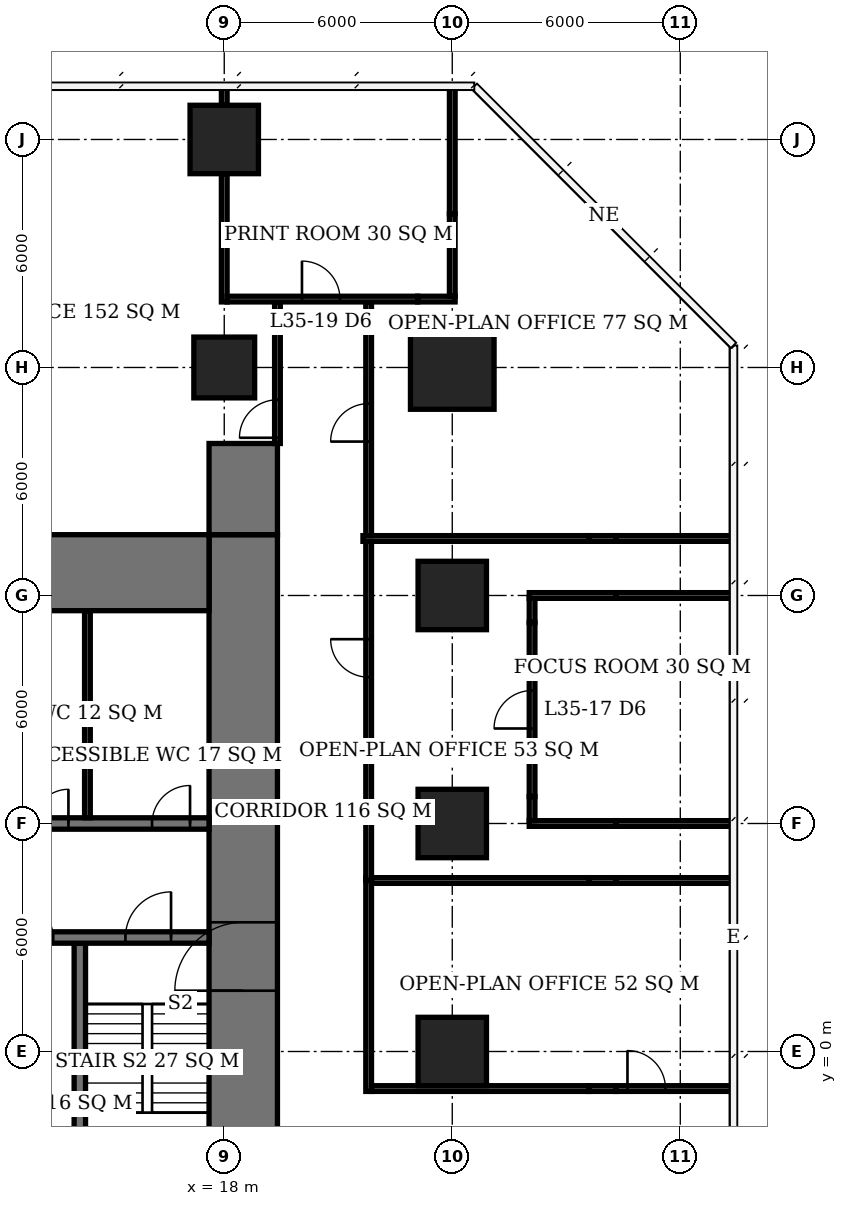
"""IFC4 building model, lengths in metres.
Left out: names, types, materials, properties, quantities, classifications, styles, units other than length and angle.
Written with IfcOpenShell. Run it as: python <this file> out.ifc"""

import sys

from ifc_helpers import new_model, si_unit, direction, frame, frame_2d, origin, origin_2d, place, context, subcontext, project, spatial, rectangle, extrude, element, fill, save


model = new_model("IFC4")
c1 = context("Model", 3, precision=1e-05, world=origin(), true_north=direction((0.0, 1.0)))
c2 = subcontext(c1, "Body", "Model", "MODEL_VIEW")
j1 = project(units=[si_unit("LENGTHUNIT", "METRE"), si_unit("PLANEANGLEUNIT", "RADIAN")], contexts=[c1])
p1 = place(None, origin())
s1 = spatial("IfcSite", under=j1, at=p1, CompositionType="ELEMENT")
p2 = place(p1, origin())
s2 = spatial("IfcBuilding", under=s1, at=p2, CompositionType="ELEMENT")
p3 = place(p2, frame((0.0, 0.0, 144.5)))
s3 = spatial("IfcBuildingStorey", under=s2, at=p3, CompositionType="ELEMENT", Elevation=144.5)
p4 = place(p3, frame((18.0, 18.0, 0.0), z_axis=(0.0, 0.0, 1.0), x_axis=(1.0, 0.0, 0.0)))
e1 = element("IfcColumn", 1, at=p4, inside=s3, PredefinedType="COLUMN", context=c2, shape_type="SweptSolid", body=[
    extrude(rectangle(XDim=1.6, YDim=1.6, at=origin_2d()), origin(), (0.0, 0.0, 1.0), 3.9),
])
for number, where, z_axis, x_axis in (
    (2, (18.0, 24.0, 0.0), (0.0, 0.0, 1.0), (1.0, 0.0, 0.0)),
    (3, (24.0, 0.0, 0.0), (0.0, 0.0, 1.0), (1.0, 0.0, 0.0)),
    (4, (24.0, 6.0, 0.0), (0.0, 0.0, 1.0), (1.0, 0.0, 0.0)),
    (5, (24.0, 12.0, 0.0), (0.0, 0.0, 1.0), (1.0, 0.0, 0.0)),
):
    element("IfcColumn", number, at=place(p3, frame(where, z_axis=z_axis, x_axis=x_axis)), inside=s3, PredefinedType="COLUMN", context=c2, shape_type="SweptSolid", body=[
        extrude(rectangle(XDim=1.8, YDim=1.8, at=origin_2d()), origin(), (0.0, 0.0, 1.0), 3.9),
    ])
p5 = place(p3, frame((24.0, 18.0, 0.0), z_axis=(0.0, 0.0, 1.0), x_axis=(1.0, 0.0, 0.0)))
e6 = element("IfcColumn", 6, at=p5, inside=s3, PredefinedType="COLUMN", context=c2, shape_type="SweptSolid", body=[
    extrude(rectangle(XDim=2.2, YDim=2.2, at=origin_2d()), origin(), (0.0, 0.0, 1.0), 3.9),
])
p6 = place(p3, frame((-5.6, 12.6, 0.0), z_axis=(0.0, 0.0, 1.0), x_axis=(1.0, 0.0, 0.0)))
e7 = element("IfcWall", 7, at=p6, inside=s3, PredefinedType="SHEAR", context=c2, shape_type="SweptSolid", body=[
    extrude(rectangle(XDim=23.2, YDim=2.0, at=frame_2d((11.6, 0.0))), origin(), (0.0, 0.0, 1.0), 3.9),
])
p7 = place(p3, frame((18.5, -7.6, 0.0), z_axis=(0.0, 0.0, 1.0), x_axis=(0.0, 1.0, 0.0)))
e8 = element("IfcWall", 8, at=p7, inside=s3, PredefinedType="SHEAR", context=c2, shape_type="SweptSolid", body=[
    extrude(rectangle(XDim=21.2, YDim=1.8, at=frame_2d((10.6, 0.0))), origin(), (0.0, 0.0, 1.0), 3.9),
])
p8 = place(p7, frame((9.2, 0.0, 0.0)))
e9 = element("IfcOpeningElement", 9, at=p8, cuts=e8, PredefinedType="OPENING", context=c2, shape_type="SweptSolid", body=[
    extrude(rectangle(XDim=1.8, YDim=2.4, at=frame_2d((0.9, 1.2))), frame((0.0, 0.91, 0.0), z_axis=(0.0, -1.0, 0.0), x_axis=(1.0, 0.0, 0.0)), (0.0, 0.0, 1.0), 1.82),
])
p9 = place(p3, frame((18.5, 13.6, 0.0), z_axis=(0.0, 0.0, 1.0), x_axis=(0.0, 1.0, 0.0)))
e10 = element("IfcWall", 10, at=p9, inside=s3, PredefinedType="SHEAR", context=c2, shape_type="SweptSolid", body=[
    extrude(rectangle(XDim=2.4, YDim=1.8, at=frame_2d((1.2, 0.0))), origin(), (0.0, 0.0, 1.0), 3.9),
])
p10 = place(p3, frame((12.15, 3.0, 0.0), z_axis=(0.0, 0.0, 1.0), x_axis=(1.0, 0.0, 0.0)))
e11 = element("IfcWall", 11, at=p10, inside=s3, PredefinedType="SHEAR", context=c2, shape_type="SweptSolid", body=[
    extrude(rectangle(XDim=5.45, YDim=0.3, at=frame_2d((2.725, 0.0))), origin(), (0.0, 0.0, 1.0), 3.9),
])
p11 = place(p10, frame((3.25, 0.0, 0.0)))
e12 = element("IfcOpeningElement", 12, at=p11, cuts=e11, PredefinedType="OPENING", context=c2, shape_type="SweptSolid", body=[
    extrude(rectangle(XDim=1.2, YDim=2.1, at=frame_2d((0.6, 1.05))), frame((0.0, 0.16, 0.0), z_axis=(0.0, -1.0, 0.0), x_axis=(1.0, 0.0, 0.0)), (0.0, 0.0, 1.0), 0.32),
])
p12 = place(p10, frame((0.45, 0.0, 0.0)))
e13 = element("IfcOpeningElement", 13, at=p12, cuts=e11, PredefinedType="OPENING", context=c2, shape_type="SweptSolid", body=[
    extrude(rectangle(XDim=0.9, YDim=2.1, at=frame_2d((0.45, 1.05))), frame((0.0, 0.16, 0.0), z_axis=(0.0, -1.0, 0.0), x_axis=(1.0, 0.0, 0.0)), (0.0, 0.0, 1.0), 0.32),
])
p13 = place(p3, frame((-0.15, 6.0, 0.0), z_axis=(0.0, 0.0, 1.0), x_axis=(1.0, 0.0, 0.0)))
e14 = element("IfcWall", 14, at=p13, inside=s3, PredefinedType="SHEAR", context=c2, shape_type="SweptSolid", body=[
    extrude(rectangle(XDim=17.75, YDim=0.3, at=frame_2d((8.875, 0.0))), origin(), (0.0, 0.0, 1.0), 3.9),
])
p14 = place(p13, frame((13.15, 0.0, 0.0)))
e15 = element("IfcOpeningElement", 15, at=p14, cuts=e14, PredefinedType="OPENING", context=c2, shape_type="SweptSolid", body=[
    extrude(rectangle(XDim=0.9, YDim=2.1, at=frame_2d((0.45, 1.05))), frame((0.0, 0.16, 0.0), z_axis=(0.0, -1.0, 0.0), x_axis=(1.0, 0.0, 0.0)), (0.0, 0.0, 1.0), 0.32),
])
p15 = place(p13, frame((16.25, 0.0, 0.0)))
e16 = element("IfcOpeningElement", 16, at=p15, cuts=e14, PredefinedType="OPENING", context=c2, shape_type="SweptSolid", body=[
    extrude(rectangle(XDim=1.0, YDim=2.1, at=frame_2d((0.5, 1.05))), frame((0.0, 0.16, 0.0), z_axis=(0.0, -1.0, 0.0), x_axis=(1.0, 0.0, 0.0)), (0.0, 0.0, 1.0), 0.32),
])
p16 = place(p13, frame((7.25, 0.0, 0.0)))
e17 = element("IfcOpeningElement", 17, at=p16, cuts=e14, PredefinedType="OPENING", context=c2, shape_type="SweptSolid", body=[
    extrude(rectangle(XDim=1.0, YDim=2.1, at=frame_2d((0.5, 1.05))), frame((0.0, 0.16, 0.0), z_axis=(0.0, -1.0, 0.0), x_axis=(1.0, 0.0, 0.0)), (0.0, 0.0, 1.0), 0.32),
])
p17 = place(p13, frame((1.1, 0.0, 0.0)))
e18 = element("IfcOpeningElement", 18, at=p17, cuts=e14, PredefinedType="OPENING", context=c2, shape_type="SweptSolid", body=[
    extrude(rectangle(XDim=1.1, YDim=2.1, at=frame_2d((0.55, 1.05))), frame((0.0, 0.16, 0.0), z_axis=(0.0, -1.0, 0.0), x_axis=(1.0, 0.0, 0.0)), (0.0, 0.0, 1.0), 0.32),
])
p18 = place(p13, frame((4.1, 0.0, 0.0)))
e19 = element("IfcOpeningElement", 19, at=p18, cuts=e14, PredefinedType="OPENING", context=c2, shape_type="SweptSolid", body=[
    extrude(rectangle(XDim=1.1, YDim=2.1, at=frame_2d((0.55, 1.05))), frame((0.0, 0.16, 0.0), z_axis=(0.0, -1.0, 0.0), x_axis=(1.0, 0.0, 0.0)), (0.0, 0.0, 1.0), 0.32),
])
p19 = place(p3, frame((14.2, -5.6, 0.0), z_axis=(0.0, 0.0, 1.0), x_axis=(0.0, 1.0, 0.0)))
e20 = element("IfcWall", 20, at=p19, inside=s3, PredefinedType="SHEAR", context=c2, shape_type="SweptSolid", body=[
    extrude(rectangle(XDim=8.45, YDim=0.3, at=frame_2d((4.225, 0.0))), origin(), (0.0, 0.0, 1.0), 3.9),
])
p20 = place(p3, frame((14.4, 6.15, 0.0), z_axis=(0.0, 0.0, 1.0), x_axis=(0.0, 1.0, 0.0)))
e21 = element("IfcWall", 21, at=p20, inside=s3, PredefinedType="PLUMBINGWALL", context=c2, shape_type="SweptSolid", body=[
    extrude(rectangle(XDim=5.45, YDim=0.15, at=frame_2d((2.725, 0.0))), origin(), (0.0, 0.0, 1.0), 3.65),
])
p21 = place(p3, frame((26.025, 6.0, 0.0), z_axis=(0.0, 0.0, 1.0), x_axis=(1.0, 0.0, 0.0)))
e22 = element("IfcWall", 22, at=p21, inside=s3, PredefinedType="PARTITIONING", context=c2, shape_type="SweptSolid", body=[
    extrude(rectangle(XDim=2.285, YDim=0.15, at=frame_2d((1.143, 0.0))), origin(), (0.0, 0.0, 1.0), 2.65),
])
p22 = place(p3, frame((28.31, 6.0, 0.0), z_axis=(0.0, 0.0, 1.0), x_axis=(1.0, 0.0, 0.0)))
e23 = element("IfcWall", 23, at=p22, inside=s3, PredefinedType="PARTITIONING", context=c2, shape_type="SweptSolid", body=[
    extrude(rectangle(XDim=3.04, YDim=0.15, at=frame_2d((1.52, 0.0))), origin(), (0.0, 0.0, 1.0), 3.65),
])
p23 = place(p3, frame((26.025, 12.0, 0.0), z_axis=(0.0, 0.0, 1.0), x_axis=(1.0, 0.0, 0.0)))
e24 = element("IfcWall", 24, at=p23, inside=s3, PredefinedType="PARTITIONING", context=c2, shape_type="SweptSolid", body=[
    extrude(rectangle(XDim=2.285, YDim=0.15, at=frame_2d((1.143, 0.0))), origin(), (0.0, 0.0, 1.0), 2.65),
])
p24 = place(p3, frame((28.31, 12.0, 0.0), z_axis=(0.0, 0.0, 1.0), x_axis=(1.0, 0.0, 0.0)))
e25 = element("IfcWall", 25, at=p24, inside=s3, PredefinedType="PARTITIONING", context=c2, shape_type="SweptSolid", body=[
    extrude(rectangle(XDim=3.09, YDim=0.15, at=frame_2d((1.545, 0.0))), origin(), (0.0, 0.0, 1.0), 3.65),
])
p25 = place(p3, frame((18.075, 19.8, 0.0), z_axis=(0.0, 0.0, 1.0), x_axis=(1.0, 0.0, 0.0)))
e26 = element("IfcWall", 26, at=p25, inside=s3, PredefinedType="PARTITIONING", context=c2, shape_type="SweptSolid", body=[
    extrude(rectangle(XDim=5.015, YDim=0.15, at=frame_2d((2.508, 0.0))), origin(), (0.0, 0.0, 1.0), 3.65),
])
p26 = place(p25, frame((1.97, 0.0, 0.0)))
e27 = element("IfcOpeningElement", 27, at=p26, cuts=e26, PredefinedType="OPENING", context=c2, shape_type="SweptSolid", body=[
    extrude(rectangle(XDim=1.0, YDim=2.1, at=frame_2d((0.5, 1.05))), frame((0.0, 0.085, 0.0), z_axis=(0.0, -1.0, 0.0), x_axis=(1.0, 0.0, 0.0)), (0.0, 0.0, 1.0), 0.17),
])
p27 = place(p3, frame((23.09, 19.8, 0.0), z_axis=(0.0, 0.0, 1.0), x_axis=(1.0, 0.0, 0.0)))
e28 = element("IfcWall", 28, at=p27, inside=s3, PredefinedType="PARTITIONING", context=c2, shape_type="SweptSolid", body=[
    extrude(rectangle(XDim=0.985, YDim=0.15, at=frame_2d((0.492, 0.0))), origin(), (0.0, 0.0, 1.0), 2.65),
])
p28 = place(p3, frame((18.0, 19.725, 0.0), z_axis=(0.0, 0.0, 1.0), x_axis=(0.0, 1.0, 0.0)))
e29 = element("IfcWall", 29, at=p28, inside=s3, PredefinedType="PARTITIONING", context=c2, shape_type="SweptSolid", body=[
    extrude(rectangle(XDim=3.375, YDim=0.15, at=frame_2d((1.688, 0.0))), origin(), (0.0, 0.0, 1.0), 3.65),
])
p29 = place(p3, frame((18.0, 24.9, 0.0), z_axis=(0.0, 0.0, 1.0), x_axis=(0.0, 1.0, 0.0)))
e30 = element("IfcWall", 30, at=p29, inside=s3, PredefinedType="PARTITIONING", context=c2, shape_type="SweptSolid", body=[
    extrude(rectangle(XDim=0.5, YDim=0.15, at=frame_2d((0.25, 0.0))), origin(), (0.0, 0.0, 1.0), 3.65),
])
p30 = place(p3, frame((24.0, 19.875, 0.0), z_axis=(0.0, 0.0, 1.0), x_axis=(0.0, 1.0, 0.0)))
e31 = element("IfcWall", 31, at=p30, inside=s3, PredefinedType="PARTITIONING", context=c2, shape_type="SweptSolid", body=[
    extrude(rectangle(XDim=2.17, YDim=0.15, at=frame_2d((1.085, 0.0))), origin(), (0.0, 0.0, 1.0), 2.65),
])
p31 = place(p3, frame((24.0, 22.045, 0.0), z_axis=(0.0, 0.0, 1.0), x_axis=(0.0, 1.0, 0.0)))
e32 = element("IfcWall", 32, at=p31, inside=s3, PredefinedType="PARTITIONING", context=c2, shape_type="SweptSolid", body=[
    extrude(rectangle(XDim=3.355, YDim=0.15, at=frame_2d((1.677, 0.0))), origin(), (0.0, 0.0, 1.0), 3.65),
])
p32 = place(p3, frame((26.1, 6.075, 0.0), z_axis=(0.0, 0.0, 1.0), x_axis=(0.0, 1.0, 0.0)))
e33 = element("IfcWall", 33, at=p32, inside=s3, PredefinedType="PARTITIONING", context=c2, shape_type="SweptSolid", body=[
    extrude(rectangle(XDim=0.635, YDim=0.15, at=frame_2d((0.317, 0.0))), origin(), (0.0, 0.0, 1.0), 2.65),
])
p33 = place(p3, frame((26.1, 6.71, 0.0), z_axis=(0.0, 0.0, 1.0), x_axis=(0.0, 1.0, 0.0)))
e34 = element("IfcWall", 34, at=p33, inside=s3, PredefinedType="PARTITIONING", context=c2, shape_type="SweptSolid", body=[
    extrude(rectangle(XDim=4.58, YDim=0.15, at=frame_2d((2.29, 0.0))), origin(), (0.0, 0.0, 1.0), 3.65),
])
p34 = place(p33, frame((1.79, 0.0, 0.0)))
e35 = element("IfcOpeningElement", 35, at=p34, cuts=e34, PredefinedType="OPENING", context=c2, shape_type="SweptSolid", body=[
    extrude(rectangle(XDim=1.0, YDim=2.1, at=frame_2d((0.5, 1.05))), frame((0.0, 0.085, 0.0), z_axis=(0.0, -1.0, 0.0), x_axis=(1.0, 0.0, 0.0)), (0.0, 0.0, 1.0), 0.17),
])
p35 = place(p3, frame((26.1, 11.29, 0.0), z_axis=(0.0, 0.0, 1.0), x_axis=(0.0, 1.0, 0.0)))
e36 = element("IfcWall", 36, at=p35, inside=s3, PredefinedType="PARTITIONING", context=c2, shape_type="SweptSolid", body=[
    extrude(rectangle(XDim=0.635, YDim=0.15, at=frame_2d((0.317, 0.0))), origin(), (0.0, 0.0, 1.0), 2.65),
])
p36 = place(p3, frame((19.4, 16.0, 0.0), z_axis=(0.0, 0.0, 1.0), x_axis=(0.0, 1.0, 0.0)))
e37 = element("IfcWall", 37, at=p36, inside=s3, PredefinedType="PARTITIONING", context=c2, shape_type="SweptSolid", body=[
    extrude(rectangle(XDim=3.725, YDim=0.15, at=frame_2d((1.863, 0.0))), origin(), (0.0, 0.0, 1.0), 3.65),
])
p37 = place(p36, frame((0.15, 0.0, 0.0)))
e38 = element("IfcOpeningElement", 38, at=p37, cuts=e37, PredefinedType="OPENING", context=c2, shape_type="SweptSolid", body=[
    extrude(rectangle(XDim=1.0, YDim=2.1, at=frame_2d((0.5, 1.05))), frame((0.0, 0.085, 0.0), z_axis=(0.0, -1.0, 0.0), x_axis=(1.0, 0.0, 0.0)), (0.0, 0.0, 1.0), 0.17),
])
p38 = place(p3, frame((21.8, -1.05, 0.0), z_axis=(0.0, 0.0, 1.0), x_axis=(0.0, 1.0, 0.0)))
e39 = element("IfcWall", 39, at=p38, inside=s3, PredefinedType="PARTITIONING", context=c2, shape_type="SweptSolid", body=[
    extrude(rectangle(XDim=5.625, YDim=0.15, at=frame_2d((2.812, 0.0))), origin(), (0.0, 0.0, 1.0), 3.65),
])
p39 = place(p3, frame((21.875, -0.975, 0.0), z_axis=(0.0, 0.0, 1.0), x_axis=(1.0, 0.0, 0.0)))
e40 = element("IfcWall", 40, at=p39, inside=s3, PredefinedType="PARTITIONING", context=c2, shape_type="SweptSolid", body=[
    extrude(rectangle(XDim=5.715, YDim=0.15, at=frame_2d((2.857, 0.0))), origin(), (0.0, 0.0, 1.0), 3.65),
])
p40 = place(p3, frame((27.59, -0.975, 0.0), z_axis=(0.0, 0.0, 1.0), x_axis=(1.0, 0.0, 0.0)))
e41 = element("IfcWall", 41, at=p40, inside=s3, PredefinedType="PARTITIONING", context=c2, shape_type="SweptSolid", body=[
    extrude(rectangle(XDim=0.72, YDim=0.15, at=frame_2d((0.36, 0.0))), origin(), (0.0, 0.0, 1.0), 2.65),
])
p41 = place(p3, frame((28.31, -0.975, 0.0), z_axis=(0.0, 0.0, 1.0), x_axis=(1.0, 0.0, 0.0)))
e42 = element("IfcWall", 42, at=p41, inside=s3, PredefinedType="PARTITIONING", context=c2, shape_type="SweptSolid", body=[
    extrude(rectangle(XDim=3.09, YDim=0.15, at=frame_2d((1.545, 0.0))), origin(), (0.0, 0.0, 1.0), 3.65),
])
p42 = place(p41, frame((0.3, 0.0, 0.0)))
e43 = element("IfcOpeningElement", 43, at=p42, cuts=e42, PredefinedType="OPENING", context=c2, shape_type="SweptSolid", body=[
    extrude(rectangle(XDim=1.0, YDim=2.1, at=frame_2d((0.5, 1.05))), frame((0.0, 0.085, 0.0), z_axis=(0.0, -1.0, 0.0), x_axis=(1.0, 0.0, 0.0)), (0.0, 0.0, 1.0), 0.17),
])
p43 = place(p3, frame((21.8, 4.5, 0.0), z_axis=(0.0, 0.0, 1.0), x_axis=(0.0, 1.0, 0.0)))
e44 = element("IfcWall", 44, at=p43, inside=s3, PredefinedType="PARTITIONING", context=c2, shape_type="SweptSolid", body=[
    extrude(rectangle(XDim=8.925, YDim=0.15, at=frame_2d((4.462, 0.0))), origin(), (0.0, 0.0, 1.0), 3.65),
])
p44 = place(p43, frame((5.35, 0.0, 0.0)))
e45 = element("IfcOpeningElement", 45, at=p44, cuts=e44, PredefinedType="OPENING", context=c2, shape_type="SweptSolid", body=[
    extrude(rectangle(XDim=1.0, YDim=2.1, at=frame_2d((0.5, 1.05))), frame((0.0, 0.085, 0.0), z_axis=(0.0, -1.0, 0.0), x_axis=(1.0, 0.0, 0.0)), (0.0, 0.0, 1.0), 0.17),
])
p45 = place(p3, frame((21.875, 4.5, 0.0), z_axis=(0.0, 0.0, 1.0), x_axis=(1.0, 0.0, 0.0)))
e46 = element("IfcWall", 46, at=p45, inside=s3, PredefinedType="PARTITIONING", context=c2, shape_type="SweptSolid", body=[
    extrude(rectangle(XDim=5.715, YDim=0.15, at=frame_2d((2.857, 0.0))), origin(), (0.0, 0.0, 1.0), 3.65),
])
p46 = place(p3, frame((27.59, 4.5, 0.0), z_axis=(0.0, 0.0, 1.0), x_axis=(1.0, 0.0, 0.0)))
e47 = element("IfcWall", 47, at=p46, inside=s3, PredefinedType="PARTITIONING", context=c2, shape_type="SweptSolid", body=[
    extrude(rectangle(XDim=0.72, YDim=0.15, at=frame_2d((0.36, 0.0))), origin(), (0.0, 0.0, 1.0), 2.65),
])
p47 = place(p3, frame((28.31, 4.5, 0.0), z_axis=(0.0, 0.0, 1.0), x_axis=(1.0, 0.0, 0.0)))
e48 = element("IfcWall", 48, at=p47, inside=s3, PredefinedType="PARTITIONING", context=c2, shape_type="SweptSolid", body=[
    extrude(rectangle(XDim=3.09, YDim=0.15, at=frame_2d((1.545, 0.0))), origin(), (0.0, 0.0, 1.0), 3.65),
])
p48 = place(p3, frame((21.8, 13.575, 0.0), z_axis=(0.0, 0.0, 1.0), x_axis=(0.0, 1.0, 0.0)))
e49 = element("IfcWall", 49, at=p48, inside=s3, PredefinedType="PARTITIONING", context=c2, shape_type="SweptSolid", body=[
    extrude(rectangle(XDim=6.15, YDim=0.15, at=frame_2d((3.075, 0.0))), origin(), (0.0, 0.0, 1.0), 3.65),
])
p49 = place(p48, frame((2.475, 0.0, 0.0)))
e50 = element("IfcOpeningElement", 50, at=p49, cuts=e49, PredefinedType="OPENING", context=c2, shape_type="SweptSolid", body=[
    extrude(rectangle(XDim=1.0, YDim=2.1, at=frame_2d((0.5, 1.05))), frame((0.0, 0.085, 0.0), z_axis=(0.0, -1.0, 0.0), x_axis=(1.0, 0.0, 0.0)), (0.0, 0.0, 1.0), 0.17),
])
p50 = place(p3, frame((21.65, 13.5, 0.0), z_axis=(0.0, 0.0, 1.0), x_axis=(1.0, 0.0, 0.0)))
e51 = element("IfcWall", 51, at=p50, inside=s3, PredefinedType="PARTITIONING", context=c2, shape_type="SweptSolid", body=[
    extrude(rectangle(XDim=5.94, YDim=0.15, at=frame_2d((2.97, 0.0))), origin(), (0.0, 0.0, 1.0), 3.65),
])
p51 = place(p3, frame((27.59, 13.5, 0.0), z_axis=(0.0, 0.0, 1.0), x_axis=(1.0, 0.0, 0.0)))
e52 = element("IfcWall", 52, at=p51, inside=s3, PredefinedType="PARTITIONING", context=c2, shape_type="SweptSolid", body=[
    extrude(rectangle(XDim=0.72, YDim=0.15, at=frame_2d((0.36, 0.0))), origin(), (0.0, 0.0, 1.0), 2.65),
])
p52 = place(p3, frame((28.31, 13.5, 0.0), z_axis=(0.0, 0.0, 1.0), x_axis=(1.0, 0.0, 0.0)))
e53 = element("IfcWall", 53, at=p52, inside=s3, PredefinedType="PARTITIONING", context=c2, shape_type="SweptSolid", body=[
    extrude(rectangle(XDim=3.09, YDim=0.15, at=frame_2d((1.545, 0.0))), origin(), (0.0, 0.0, 1.0), 3.65),
])
p53 = place(p8, origin())
e54 = element("IfcDoor", 54, at=p53, inside=s3, OperationType="DOUBLE_DOOR_SINGLE_SWING", PredefinedType="DOOR", context=c2, shape_type="SweptSolid", body=[
    extrude(rectangle(XDim=1.8, YDim=2.4, at=frame_2d((0.9, 1.2))), frame((0.0, 0.025, 0.0), z_axis=(0.0, -1.0, 0.0), x_axis=(1.0, 0.0, 0.0)), (0.0, 0.0, 1.0), 0.05),
])
fill(e9, e54)
p54 = place(p11, origin())
e55 = element("IfcDoor", 55, at=p54, inside=s3, OperationType="SINGLE_SWING_RIGHT", PredefinedType="DOOR", context=c2, shape_type="SweptSolid", body=[
    extrude(rectangle(XDim=1.2, YDim=2.1, at=frame_2d((0.6, 1.05))), frame((0.0, 0.025, 0.0), z_axis=(0.0, -1.0, 0.0), x_axis=(1.0, 0.0, 0.0)), (0.0, 0.0, 1.0), 0.05),
])
fill(e12, e55)
p55 = place(p12, origin())
e56 = element("IfcDoor", 56, at=p55, inside=s3, OperationType="SINGLE_SWING_LEFT", PredefinedType="DOOR", context=c2, shape_type="SweptSolid", body=[
    extrude(rectangle(XDim=0.9, YDim=2.1, at=frame_2d((0.45, 1.05))), frame((0.0, 0.025, 0.0), z_axis=(0.0, -1.0, 0.0), x_axis=(1.0, 0.0, 0.0)), (0.0, 0.0, 1.0), 0.05),
])
fill(e13, e56)
p56 = place(p14, origin())
e57 = element("IfcDoor", 57, at=p56, inside=s3, OperationType="SINGLE_SWING_RIGHT", PredefinedType="DOOR", context=c2, shape_type="SweptSolid", body=[
    extrude(rectangle(XDim=0.9, YDim=2.1, at=frame_2d((0.45, 1.05))), frame((0.0, 0.025, 0.0), z_axis=(0.0, -1.0, 0.0), x_axis=(1.0, 0.0, 0.0)), (0.0, 0.0, 1.0), 0.05),
])
fill(e15, e57)
p57 = place(p15, origin())
e58 = element("IfcDoor", 58, at=p57, inside=s3, OperationType="SINGLE_SWING_RIGHT", PredefinedType="DOOR", context=c2, shape_type="SweptSolid", body=[
    extrude(rectangle(XDim=1.0, YDim=2.1, at=frame_2d((0.5, 1.05))), frame((0.0, 0.025, 0.0), z_axis=(0.0, -1.0, 0.0), x_axis=(1.0, 0.0, 0.0)), (0.0, 0.0, 1.0), 0.05),
])
fill(e16, e58)
p58 = place(p34, origin())
e59 = element("IfcDoor", 59, at=p58, inside=s3, OperationType="SINGLE_SWING_LEFT", PredefinedType="DOOR", context=c2, shape_type="SweptSolid", body=[
    extrude(rectangle(XDim=1.0, YDim=2.1, at=frame_2d((0.5, 1.05))), frame((0.0, 0.025, 0.0), z_axis=(0.0, -1.0, 0.0), x_axis=(1.0, 0.0, 0.0)), (0.0, 0.0, 1.0), 0.05),
])
fill(e35, e59)
p59 = place(p26, origin())
e60 = element("IfcDoor", 60, at=p59, inside=s3, OperationType="SINGLE_SWING_LEFT", PredefinedType="DOOR", context=c2, shape_type="SweptSolid", body=[
    extrude(rectangle(XDim=1.0, YDim=2.1, at=frame_2d((0.5, 1.05))), frame((0.0, 0.025, 0.0), z_axis=(0.0, -1.0, 0.0), x_axis=(1.0, 0.0, 0.0)), (0.0, 0.0, 1.0), 0.05),
])
fill(e27, e60)
p60 = place(p42, origin())
e61 = element("IfcDoor", 61, at=p60, inside=s3, OperationType="SINGLE_SWING_LEFT", PredefinedType="DOOR", context=c2, shape_type="SweptSolid", body=[
    extrude(rectangle(XDim=1.0, YDim=2.1, at=frame_2d((0.5, 1.05))), frame((0.0, 0.025, 0.0), z_axis=(0.0, -1.0, 0.0), x_axis=(1.0, 0.0, 0.0)), (0.0, 0.0, 1.0), 0.05),
])
fill(e43, e61)
p61 = place(p44, origin())
e62 = element("IfcDoor", 62, at=p61, inside=s3, OperationType="SINGLE_SWING_RIGHT", PredefinedType="DOOR", context=c2, shape_type="SweptSolid", body=[
    extrude(rectangle(XDim=1.0, YDim=2.1, at=frame_2d((0.5, 1.05))), frame((0.0, 0.025, 0.0), z_axis=(0.0, -1.0, 0.0), x_axis=(1.0, 0.0, 0.0)), (0.0, 0.0, 1.0), 0.05),
])
fill(e45, e62)
p62 = place(p49, origin())
e63 = element("IfcDoor", 63, at=p62, inside=s3, OperationType="SINGLE_SWING_LEFT", PredefinedType="DOOR", context=c2, shape_type="SweptSolid", body=[
    extrude(rectangle(XDim=1.0, YDim=2.1, at=frame_2d((0.5, 1.05))), frame((0.0, 0.025, 0.0), z_axis=(0.0, -1.0, 0.0), x_axis=(1.0, 0.0, 0.0)), (0.0, 0.0, 1.0), 0.05),
])
fill(e50, e63)
p63 = place(p37, origin())
e64 = element("IfcDoor", 64, at=p63, inside=s3, OperationType="SINGLE_SWING_LEFT", PredefinedType="DOOR", context=c2, shape_type="SweptSolid", body=[
    extrude(rectangle(XDim=1.0, YDim=2.1, at=frame_2d((0.5, 1.05))), frame((0.0, 0.025, 0.0), z_axis=(0.0, -1.0, 0.0), x_axis=(1.0, 0.0, 0.0)), (0.0, 0.0, 1.0), 0.05),
])
fill(e38, e64)
save(model, sys.argv[1])
